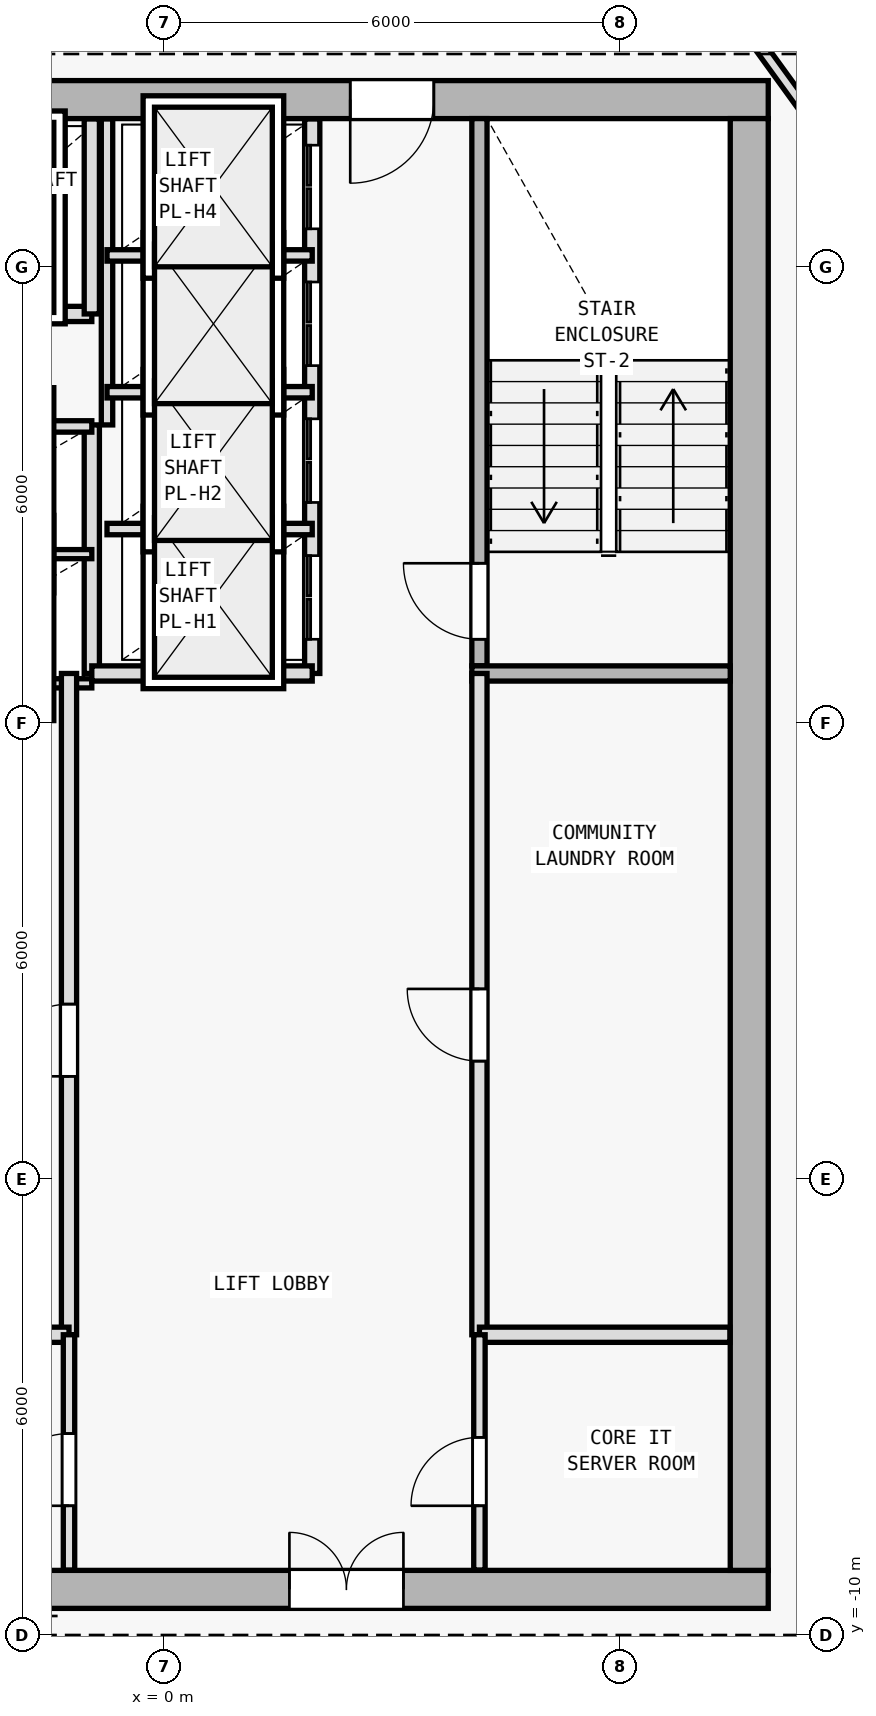
"""IFC4 building model, lengths in metres.
Left out: names, types, materials, properties, quantities, classifications, styles, units other than length and angle.
Written with IfcOpenShell. Run it as: python <this file> out.ifc"""

import sys

from ifc_helpers import new_model, si_unit, direction, frame, frame_2d, origin, origin_2d, place, context, subcontext, project, spatial, rectangle, i_section, extrude, element, fill, save


model = new_model("IFC4")
c1 = context("Model", 3, precision=1e-05, world=origin(), true_north=direction((0.0, 1.0)))
c2 = subcontext(c1, "Body", "Model", "MODEL_VIEW")
j1 = project(units=[si_unit("LENGTHUNIT", "METRE"), si_unit("PLANEANGLEUNIT", "RADIAN")], contexts=[c1])
p1 = place(None, origin())
s1 = spatial("IfcSite", under=j1, at=p1, CompositionType="ELEMENT")
p2 = place(p1, origin())
s2 = spatial("IfcBuilding", under=s1, at=p2, CompositionType="ELEMENT")
p3 = place(p2, frame((0.0, 0.0, 276.0)))
s3 = spatial("IfcBuildingStorey", under=s2, at=p3, CompositionType="ELEMENT", Elevation=276.0)
for number, where, z_axis, x_axis in (
    (1, (7.7, -9.4, 0.0), (0.0, 0.0, 1.0), (1.0, 0.0, 0.0)),
    (2, (7.7, 10.2, 0.0), (0.0, 0.0, 1.0), (1.0, 0.0, 0.0)),
    (3, (0.0, -9.4, 0.0), (0.0, 0.0, 1.0), (1.0, 0.0, 0.0)),
    (4, (7.7, 0.4, 0.0), (0.0, 0.0, 1.0), (1.0, 0.0, 0.0)),
):
    element("IfcColumn", number, at=place(p3, frame(where, z_axis=z_axis, x_axis=x_axis)), inside=s3, PredefinedType="COLUMN", context=c2, shape_type="SweptSolid", body=[
        extrude(i_section(OverallWidth=0.374, OverallDepth=0.372, WebThickness=0.012, FlangeThickness=0.02, FilletRadius=0.015, at=origin_2d()), origin(), (0.0, 0.0, 1.0), 3.6),
    ])
p4 = place(p3, frame((-7.95, -9.4, 0.0), z_axis=(0.0, 0.0, 1.0), x_axis=(1.0, 0.0, 0.0)))
e5 = element("IfcWall", 5, at=p4, inside=s3, PredefinedType="SHEAR", context=c2, shape_type="SweptSolid", body=[
    extrude(rectangle(XDim=15.9, YDim=0.5, at=frame_2d((7.95, 0.0))), origin(), (0.0, 0.0, 1.0), 3.35),
])
p5 = place(p4, frame((9.6, 0.0, 0.0)))
e6 = element("IfcOpeningElement", 6, at=p5, cuts=e5, PredefinedType="OPENING", context=c2, shape_type="SweptSolid", body=[
    extrude(rectangle(XDim=1.5, YDim=2.2, at=frame_2d((0.75, 1.1))), frame((0.0, 0.26, 0.0), z_axis=(0.0, -1.0, 0.0), x_axis=(1.0, 0.0, 0.0)), (0.0, 0.0, 1.0), 0.52),
])
p6 = place(p3, frame((7.95, 10.2, 0.0), z_axis=(0.0, 0.0, 1.0), x_axis=(-1.0, 0.0, 0.0)))
e7 = element("IfcWall", 7, at=p6, inside=s3, PredefinedType="SHEAR", context=c2, shape_type="SweptSolid", body=[
    extrude(rectangle(XDim=15.9, YDim=0.5, at=frame_2d((7.95, 0.0))), origin(), (0.0, 0.0, 1.0), 3.35),
])
p7 = place(p6, frame((4.4, 0.0, 0.0)))
e8 = element("IfcOpeningElement", 8, at=p7, cuts=e7, PredefinedType="OPENING", context=c2, shape_type="SweptSolid", body=[
    extrude(rectangle(XDim=1.1, YDim=2.15, at=frame_2d((0.55, 1.075))), frame((0.0, 0.26, 0.0), z_axis=(0.0, -1.0, 0.0), x_axis=(1.0, 0.0, 0.0)), (0.0, 0.0, 1.0), 0.52),
])
p8 = place(p3, frame((7.7, 9.95, 0.0), z_axis=(0.0, 0.0, 1.0), x_axis=(0.0, -1.0, 0.0)))
e9 = element("IfcWall", 9, at=p8, inside=s3, PredefinedType="SHEAR", context=c2, shape_type="SweptSolid", body=[
    extrude(rectangle(XDim=19.1, YDim=0.5, at=frame_2d((9.55, 0.0))), origin(), (0.0, 0.0, 1.0), 3.35),
])
p9 = place(p3, frame((4.15, 2.75, 0.0), z_axis=(0.0, 0.0, 1.0), x_axis=(0.0, 1.0, 0.0)))
e10 = element("IfcWall", 10, at=p9, inside=s3, PredefinedType="SOLIDWALL", context=c2, shape_type="SweptSolid", body=[
    extrude(rectangle(XDim=7.2, YDim=0.2, at=frame_2d((3.6, 0.0))), origin(), (0.0, 0.0, 1.0), 3.35),
])
p10 = place(p9, frame((0.35, 0.0, 0.0)))
e11 = element("IfcOpeningElement", 11, at=p10, cuts=e10, PredefinedType="OPENING", context=c2, shape_type="SweptSolid", body=[
    extrude(rectangle(XDim=1.0, YDim=2.15, at=frame_2d((0.5, 1.075))), frame((0.0, 0.11, 0.0), z_axis=(0.0, -1.0, 0.0), x_axis=(1.0, 0.0, 0.0)), (0.0, 0.0, 1.0), 0.22),
])
p11 = place(p3, frame((4.05, 2.65, 0.0), z_axis=(0.0, 0.0, 1.0), x_axis=(1.0, 0.0, 0.0)))
e12 = element("IfcWall", 12, at=p11, inside=s3, PredefinedType="SOLIDWALL", context=c2, shape_type="SweptSolid", body=[
    extrude(rectangle(XDim=3.4, YDim=0.2, at=frame_2d((1.7, 0.0))), origin(), (0.0, 0.0, 1.0), 3.35),
])
p12 = place(p3, frame((-0.95, 2.65, 0.0), z_axis=(0.0, 0.0, 1.0), x_axis=(0.0, 1.0, 0.0)))
e13 = element("IfcWall", 13, at=p12, inside=s3, PredefinedType="SOLIDWALL", context=c2, shape_type="SweptSolid", body=[
    extrude(rectangle(XDim=3.27, YDim=0.2, at=frame_2d((1.635, 0.0))), origin(), (0.0, 0.0, 1.0), 3.35),
])
for number, where, z_axis, x_axis in (
    (14, (-3.85, 2.52, 0.0), (0.0, 0.0, 1.0), (1.0, 0.0, 0.0)),
    (15, (-3.85, 4.22, 0.0), (0.0, 0.0, 1.0), (1.0, 0.0, 0.0)),
):
    element("IfcWall", number, at=place(p3, frame(where, z_axis=z_axis, x_axis=x_axis)), inside=s3, PredefinedType="PARTITIONING", context=c2, shape_type="SweptSolid", body=[
        extrude(rectangle(XDim=2.9, YDim=0.12, at=frame_2d((1.45, 0.0))), origin(), (0.0, 0.0, 1.0), 3.35),
    ])
p13 = place(p3, frame((-3.85, 5.9, 0.0), z_axis=(0.0, 0.0, 1.0), x_axis=(1.0, 0.0, 0.0)))
e16 = element("IfcWall", 16, at=p13, inside=s3, PredefinedType="PARTITIONING", context=c2, shape_type="SweptSolid", body=[
    extrude(rectangle(XDim=2.9, YDim=0.15, at=frame_2d((1.45, 0.0))), origin(), (0.0, 0.0, 1.0), 3.35),
])
p14 = place(p3, frame((-3.85, 7.38, 0.0), z_axis=(0.0, 0.0, 1.0), x_axis=(1.0, 0.0, 0.0)))
e17 = element("IfcWall", 17, at=p14, inside=s3, PredefinedType="SOLIDWALL", context=c2, shape_type="SweptSolid", body=[
    extrude(rectangle(XDim=2.9, YDim=0.2, at=frame_2d((1.45, 0.0))), origin(), (0.0, 0.0, 1.0), 3.35),
])
p15 = place(p14, frame((0.85, 0.0, 0.0)))
e18 = element("IfcOpeningElement", 18, at=p15, cuts=e17, PredefinedType="OPENING", context=c2, shape_type="SweptSolid", body=[
    extrude(rectangle(XDim=1.2, YDim=2.2, at=frame_2d((0.6, 1.1))), frame((0.0, 0.11, 0.0), z_axis=(0.0, -1.0, 0.0), x_axis=(1.0, 0.0, 0.0)), (0.0, 0.0, 1.0), 0.22),
])
p16 = place(p3, frame((-0.95, 7.38, 0.0), z_axis=(0.0, 0.0, 1.0), x_axis=(0.0, 1.0, 0.0)))
e19 = element("IfcWall", 19, at=p16, inside=s3, PredefinedType="SOLIDWALL", context=c2, shape_type="SweptSolid", body=[
    extrude(rectangle(XDim=2.565, YDim=0.2, at=frame_2d((1.283, 0.0))), origin(), (0.0, 0.0, 1.0), 3.35),
])
p17 = place(p3, frame((4.15, -6.05, 0.0), z_axis=(0.0, 0.0, 1.0), x_axis=(0.0, 1.0, 0.0)))
e20 = element("IfcWall", 20, at=p17, inside=s3, PredefinedType="SOLIDWALL", context=c2, shape_type="SweptSolid", body=[
    extrude(rectangle(XDim=8.7, YDim=0.2, at=frame_2d((4.35, 0.0))), origin(), (0.0, 0.0, 1.0), 3.35),
])
p18 = place(p17, frame((3.6, 0.0, 0.0)))
e21 = element("IfcOpeningElement", 21, at=p18, cuts=e20, PredefinedType="OPENING", context=c2, shape_type="SweptSolid", body=[
    extrude(rectangle(XDim=0.95, YDim=2.1, at=frame_2d((0.475, 1.05))), frame((0.0, 0.11, 0.0), z_axis=(0.0, -1.0, 0.0), x_axis=(1.0, 0.0, 0.0)), (0.0, 0.0, 1.0), 0.22),
])
p19 = place(p3, frame((-1.25, -6.05, 0.0), z_axis=(0.0, 0.0, 1.0), x_axis=(0.0, 1.0, 0.0)))
e22 = element("IfcWall", 22, at=p19, inside=s3, PredefinedType="SOLIDWALL", context=c2, shape_type="SweptSolid", body=[
    extrude(rectangle(XDim=8.7, YDim=0.2, at=frame_2d((4.35, 0.0))), origin(), (0.0, 0.0, 1.0), 3.35),
])
p20 = place(p19, frame((3.4, 0.0, 0.0)))
e23 = element("IfcOpeningElement", 23, at=p20, cuts=e22, PredefinedType="OPENING", context=c2, shape_type="SweptSolid", body=[
    extrude(rectangle(XDim=0.95, YDim=2.1, at=frame_2d((0.475, 1.05))), frame((0.0, 0.11, 0.0), z_axis=(0.0, -1.0, 0.0), x_axis=(1.0, 0.0, 0.0)), (0.0, 0.0, 1.0), 0.22),
])
p21 = place(p3, frame((1.95, 2.65, 0.0), z_axis=(0.0, 0.0, 1.0), x_axis=(0.0, 1.0, 0.0)))
e24 = element("IfcWall", 24, at=p21, inside=s3, PredefinedType="SOLIDWALL", context=c2, shape_type="SweptSolid", body=[
    extrude(rectangle(XDim=7.295, YDim=0.2, at=frame_2d((3.647, 0.0))), origin(), (0.0, 0.0, 1.0), 3.35),
])
p22 = place(p21, frame((0.45, 0.0, 0.0)))
e25 = element("IfcOpeningElement", 25, at=p22, cuts=e24, PredefinedType="OPENING", context=c2, shape_type="SweptSolid", body=[
    extrude(rectangle(XDim=1.1, YDim=2.15, at=frame_2d((0.55, 1.075))), frame((0.0, 0.11, 0.0), z_axis=(0.0, -1.0, 0.0), x_axis=(1.0, 0.0, 0.0)), (0.0, 0.0, 1.0), 0.22),
])
p23 = place(p21, frame((2.25, 0.0, 0.0)))
e26 = element("IfcOpeningElement", 26, at=p23, cuts=e24, PredefinedType="OPENING", context=c2, shape_type="SweptSolid", body=[
    extrude(rectangle(XDim=1.1, YDim=2.15, at=frame_2d((0.55, 1.075))), frame((0.0, 0.11, 0.0), z_axis=(0.0, -1.0, 0.0), x_axis=(1.0, 0.0, 0.0)), (0.0, 0.0, 1.0), 0.22),
])
p24 = place(p21, frame((4.05, 0.0, 0.0)))
e27 = element("IfcOpeningElement", 27, at=p24, cuts=e24, PredefinedType="OPENING", context=c2, shape_type="SweptSolid", body=[
    extrude(rectangle(XDim=1.1, YDim=2.15, at=frame_2d((0.55, 1.075))), frame((0.0, 0.11, 0.0), z_axis=(0.0, -1.0, 0.0), x_axis=(1.0, 0.0, 0.0)), (0.0, 0.0, 1.0), 0.22),
])
p25 = place(p21, frame((5.85, 0.0, 0.0)))
e28 = element("IfcOpeningElement", 28, at=p25, cuts=e24, PredefinedType="OPENING", context=c2, shape_type="SweptSolid", body=[
    extrude(rectangle(XDim=1.1, YDim=2.15, at=frame_2d((0.55, 1.075))), frame((0.0, 0.11, 0.0), z_axis=(0.0, -1.0, 0.0), x_axis=(1.0, 0.0, 0.0)), (0.0, 0.0, 1.0), 0.22),
])
p26 = place(p3, frame((-0.95, 2.65, 0.0), z_axis=(0.0, 0.0, 1.0), x_axis=(1.0, 0.0, 0.0)))
e29 = element("IfcWall", 29, at=p26, inside=s3, PredefinedType="SOLIDWALL", context=c2, shape_type="SweptSolid", body=[
    extrude(rectangle(XDim=2.9, YDim=0.2, at=frame_2d((1.45, 0.0))), origin(), (0.0, 0.0, 1.0), 3.35),
])
p27 = place(p3, frame((-0.75, 5.92, 0.0), z_axis=(0.0, 0.0, 1.0), x_axis=(0.0, 1.0, 0.0)))
e30 = element("IfcWall", 30, at=p27, inside=s3, PredefinedType="PARTITIONING", context=c2, shape_type="SweptSolid", body=[
    extrude(rectangle(XDim=4.025, YDim=0.15, at=frame_2d((2.013, 0.0))), origin(), (0.0, 0.0, 1.0), 3.35),
])
for number, where, z_axis, x_axis in (
    (31, (-0.75, 4.55, 0.0), (0.0, 0.0, 1.0), (1.0, 0.0, 0.0)),
    (32, (-0.75, 6.35, 0.0), (0.0, 0.0, 1.0), (1.0, 0.0, 0.0)),
    (33, (-0.75, 8.15, 0.0), (0.0, 0.0, 1.0), (1.0, 0.0, 0.0)),
):
    element("IfcWall", number, at=place(p3, frame(where, z_axis=z_axis, x_axis=x_axis)), inside=s3, PredefinedType="PARTITIONING", context=c2, shape_type="SweptSolid", body=[
        extrude(rectangle(XDim=2.7, YDim=0.15, at=frame_2d((1.35, 0.0))), origin(), (0.0, 0.0, 1.0), 3.35),
    ])
p28 = place(p3, frame((-4.04, -6.05, 0.0), z_axis=(0.0, 0.0, 1.0), x_axis=(1.0, 0.0, 0.0)))
e34 = element("IfcWall", 34, at=p28, inside=s3, PredefinedType="SOLIDWALL", context=c2, shape_type="SweptSolid", body=[
    extrude(rectangle(XDim=2.79, YDim=0.2, at=frame_2d((1.395, 0.0))), origin(), (0.0, 0.0, 1.0), 3.35),
])
p29 = place(p3, frame((4.15, -6.05, 0.0), z_axis=(0.0, 0.0, 1.0), x_axis=(1.0, 0.0, 0.0)))
e35 = element("IfcWall", 35, at=p29, inside=s3, PredefinedType="SOLIDWALL", context=c2, shape_type="SweptSolid", body=[
    extrude(rectangle(XDim=3.295, YDim=0.2, at=frame_2d((1.647, 0.0))), origin(), (0.0, 0.0, 1.0), 3.35),
])
p30 = place(p3, frame((-1.25, -9.145, 0.0), z_axis=(0.0, 0.0, 1.0), x_axis=(0.0, 1.0, 0.0)))
e36 = element("IfcWall", 36, at=p30, inside=s3, PredefinedType="PARTITIONING", context=c2, shape_type="SweptSolid", body=[
    extrude(rectangle(XDim=3.095, YDim=0.15, at=frame_2d((1.547, 0.0))), origin(), (0.0, 0.0, 1.0), 3.35),
])
p31 = place(p30, frame((0.845, 0.0, 0.0)))
e37 = element("IfcOpeningElement", 37, at=p31, cuts=e36, PredefinedType="OPENING", context=c2, shape_type="SweptSolid", body=[
    extrude(rectangle(XDim=0.95, YDim=2.1, at=frame_2d((0.475, 1.05))), frame((0.0, 0.085, 0.0), z_axis=(0.0, -1.0, 0.0), x_axis=(1.0, 0.0, 0.0)), (0.0, 0.0, 1.0), 0.17),
])
p32 = place(p3, frame((4.15, -9.145, 0.0), z_axis=(0.0, 0.0, 1.0), x_axis=(0.0, 1.0, 0.0)))
e38 = element("IfcWall", 38, at=p32, inside=s3, PredefinedType="PARTITIONING", context=c2, shape_type="SweptSolid", body=[
    extrude(rectangle(XDim=3.095, YDim=0.15, at=frame_2d((1.547, 0.0))), origin(), (0.0, 0.0, 1.0), 3.35),
])
p33 = place(p32, frame((0.845, 0.0, 0.0)))
e39 = element("IfcOpeningElement", 39, at=p33, cuts=e38, PredefinedType="OPENING", context=c2, shape_type="SweptSolid", body=[
    extrude(rectangle(XDim=0.9, YDim=2.1, at=frame_2d((0.45, 1.05))), frame((0.0, 0.085, 0.0), z_axis=(0.0, -1.0, 0.0), x_axis=(1.0, 0.0, 0.0)), (0.0, 0.0, 1.0), 0.17),
])
p34 = place(p3, frame((6.841, 12.28, 0.0), z_axis=(0.0, 0.0, 1.0), x_axis=(0.586956386413, -0.809618552436, 0.0)))
e40 = element("IfcWall", 40, at=p34, inside=s3, PredefinedType="PARTITIONING", context=c2, shape_type="SweptSolid", body=[
    extrude(rectangle(XDim=5.008, YDim=0.15, at=frame_2d((2.504, 0.0))), origin(), (0.0, 0.0, 1.0), 3.025),
])
p35 = place(p5, origin())
e41 = element("IfcDoor", 41, at=p35, inside=s3, OperationType="DOUBLE_DOOR_SINGLE_SWING", PredefinedType="DOOR", context=c2, shape_type="SweptSolid", body=[
    extrude(rectangle(XDim=1.5, YDim=2.2, at=frame_2d((0.75, 1.1))), frame((0.0, 0.025, 0.0), z_axis=(0.0, -1.0, 0.0), x_axis=(1.0, 0.0, 0.0)), (0.0, 0.0, 1.0), 0.05),
])
fill(e6, e41)
p36 = place(p7, origin())
e42 = element("IfcDoor", 42, at=p36, inside=s3, OperationType="SINGLE_SWING_RIGHT", PredefinedType="DOOR", context=c2, shape_type="SweptSolid", body=[
    extrude(rectangle(XDim=1.1, YDim=2.15, at=frame_2d((0.55, 1.075))), frame((0.0, 0.025, 0.0), z_axis=(0.0, -1.0, 0.0), x_axis=(1.0, 0.0, 0.0)), (0.0, 0.0, 1.0), 0.05),
])
fill(e8, e42)
p37 = place(p10, origin())
e43 = element("IfcDoor", 43, at=p37, inside=s3, OperationType="SINGLE_SWING_RIGHT", PredefinedType="DOOR", context=c2, shape_type="SweptSolid", body=[
    extrude(rectangle(XDim=1.0, YDim=2.15, at=frame_2d((0.5, 1.075))), frame((0.0, 0.025, 0.0), z_axis=(0.0, -1.0, 0.0), x_axis=(1.0, 0.0, 0.0)), (0.0, 0.0, 1.0), 0.05),
])
fill(e11, e43)
p38 = place(p18, origin())
e44 = element("IfcDoor", 44, at=p38, inside=s3, OperationType="SINGLE_SWING_RIGHT", PredefinedType="DOOR", context=c2, shape_type="SweptSolid", body=[
    extrude(rectangle(XDim=0.95, YDim=2.1, at=frame_2d((0.475, 1.05))), frame((0.0, 0.025, 0.0), z_axis=(0.0, -1.0, 0.0), x_axis=(1.0, 0.0, 0.0)), (0.0, 0.0, 1.0), 0.05),
])
fill(e21, e44)
p39 = place(p20, origin())
e45 = element("IfcDoor", 45, at=p39, inside=s3, OperationType="SINGLE_SWING_LEFT", PredefinedType="DOOR", context=c2, shape_type="SweptSolid", body=[
    extrude(rectangle(XDim=0.95, YDim=2.1, at=frame_2d((0.475, 1.05))), frame((0.0, 0.025, 0.0), z_axis=(0.0, -1.0, 0.0), x_axis=(1.0, 0.0, 0.0)), (0.0, 0.0, 1.0), 0.05),
])
fill(e23, e45)
p40 = place(p22, origin())
e46 = element("IfcDoor", 46, at=p40, inside=s3, OperationType="DOUBLE_DOOR_SLIDING", PredefinedType="DOOR", context=c2, shape_type="SweptSolid", body=[
    extrude(rectangle(XDim=1.1, YDim=2.15, at=frame_2d((0.55, 1.075))), frame((0.0, 0.025, 0.0), z_axis=(0.0, -1.0, 0.0), x_axis=(1.0, 0.0, 0.0)), (0.0, 0.0, 1.0), 0.05),
])
fill(e25, e46)
p41 = place(p23, origin())
e47 = element("IfcDoor", 47, at=p41, inside=s3, OperationType="DOUBLE_DOOR_SLIDING", PredefinedType="DOOR", context=c2, shape_type="SweptSolid", body=[
    extrude(rectangle(XDim=1.1, YDim=2.15, at=frame_2d((0.55, 1.075))), frame((0.0, 0.025, 0.0), z_axis=(0.0, -1.0, 0.0), x_axis=(1.0, 0.0, 0.0)), (0.0, 0.0, 1.0), 0.05),
])
fill(e26, e47)
p42 = place(p24, origin())
e48 = element("IfcDoor", 48, at=p42, inside=s3, OperationType="DOUBLE_DOOR_SLIDING", PredefinedType="DOOR", context=c2, shape_type="SweptSolid", body=[
    extrude(rectangle(XDim=1.1, YDim=2.15, at=frame_2d((0.55, 1.075))), frame((0.0, 0.025, 0.0), z_axis=(0.0, -1.0, 0.0), x_axis=(1.0, 0.0, 0.0)), (0.0, 0.0, 1.0), 0.05),
])
fill(e27, e48)
p43 = place(p25, origin())
e49 = element("IfcDoor", 49, at=p43, inside=s3, OperationType="DOUBLE_DOOR_SLIDING", PredefinedType="DOOR", context=c2, shape_type="SweptSolid", body=[
    extrude(rectangle(XDim=1.1, YDim=2.15, at=frame_2d((0.55, 1.075))), frame((0.0, 0.025, 0.0), z_axis=(0.0, -1.0, 0.0), x_axis=(1.0, 0.0, 0.0)), (0.0, 0.0, 1.0), 0.05),
])
fill(e28, e49)
p44 = place(p31, origin())
e50 = element("IfcDoor", 50, at=p44, inside=s3, OperationType="SINGLE_SWING_LEFT", PredefinedType="DOOR", context=c2, shape_type="SweptSolid", body=[
    extrude(rectangle(XDim=0.95, YDim=2.1, at=frame_2d((0.475, 1.05))), frame((0.0, 0.025, 0.0), z_axis=(0.0, -1.0, 0.0), x_axis=(1.0, 0.0, 0.0)), (0.0, 0.0, 1.0), 0.05),
])
fill(e37, e50)
p45 = place(p33, origin())
e51 = element("IfcDoor", 51, at=p45, inside=s3, OperationType="SINGLE_SWING_LEFT", PredefinedType="DOOR", context=c2, shape_type="SweptSolid", body=[
    extrude(rectangle(XDim=0.9, YDim=2.1, at=frame_2d((0.45, 1.05))), frame((0.0, 0.025, 0.0), z_axis=(0.0, -1.0, 0.0), x_axis=(1.0, 0.0, 0.0)), (0.0, 0.0, 1.0), 0.05),
])
fill(e39, e51)
save(model, sys.argv[1])
